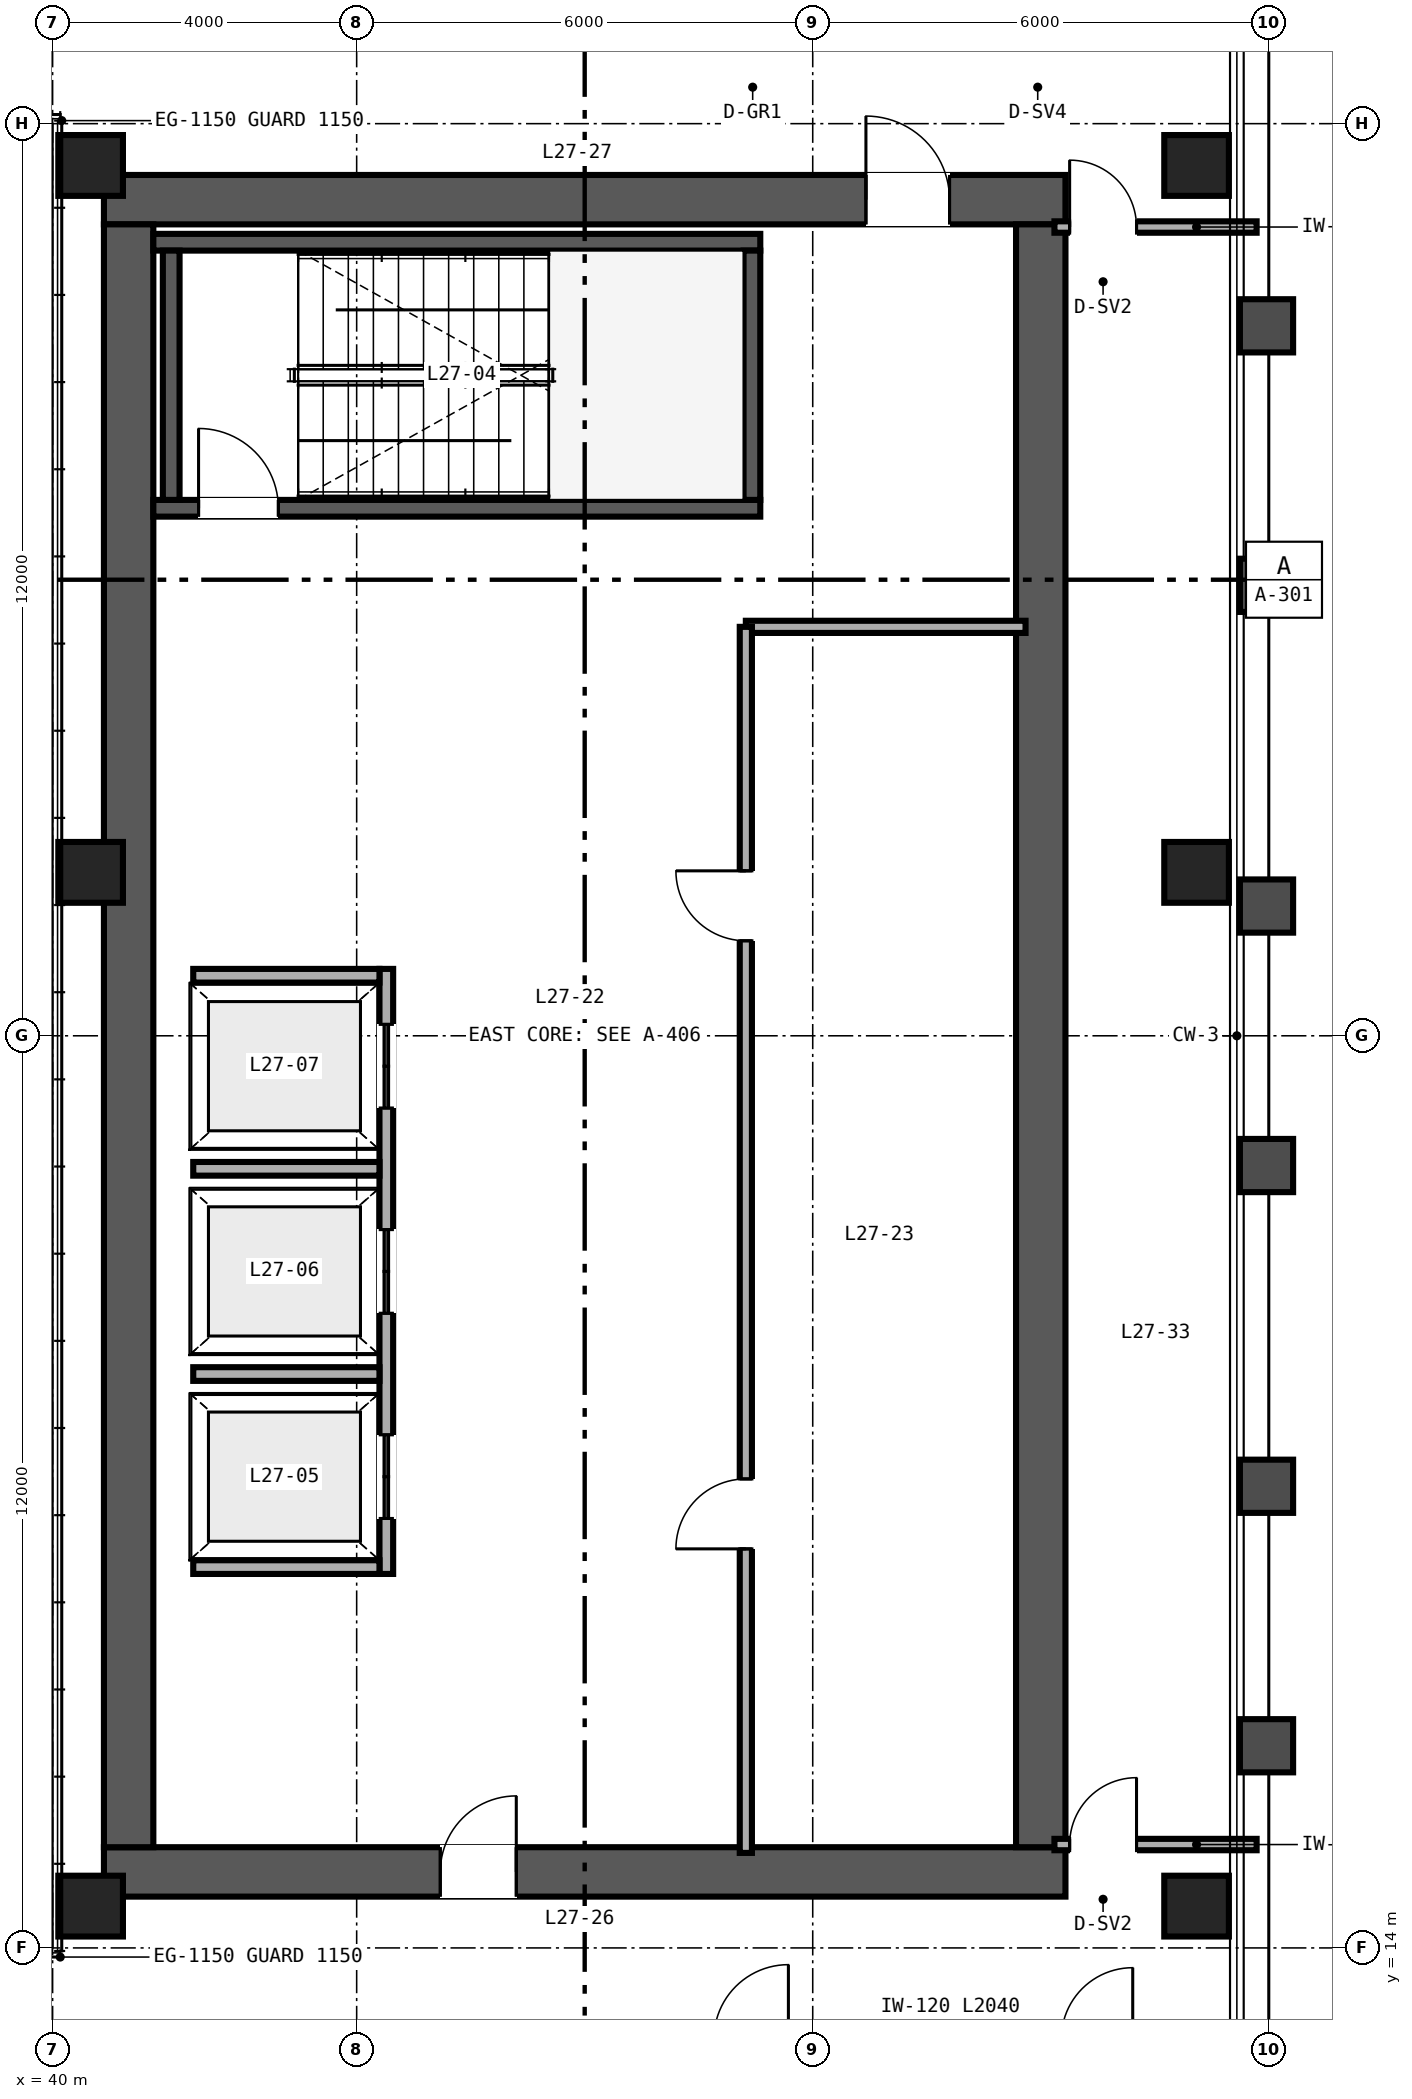
"""IFC4 building model, lengths in metres.
Left out: names, types, materials, properties, quantities, classifications, styles, units other than length and angle.
Written with IfcOpenShell. Run it as: python <this file> out.ifc"""

import sys

from ifc_helpers import new_model, si_unit, direction, frame, frame_2d, origin, origin_2d, place, context, subcontext, project, spatial, rectangle, hollow_rectangle, extrude, source, transform, mapped, element, fill, save


model = new_model("IFC4")
c1 = context("Model", 3, precision=1e-05, world=origin(), true_north=direction((0.0, 1.0)))
c2 = subcontext(c1, "Body", "Model", "MODEL_VIEW")
j1 = project(units=[si_unit("LENGTHUNIT", "METRE"), si_unit("PLANEANGLEUNIT", "RADIAN")], contexts=[c1])
p1 = place(None, origin())
s1 = spatial("IfcSite", under=j1, at=p1, CompositionType="ELEMENT")
p2 = place(p1, origin())
s2 = spatial("IfcBuilding", under=s1, at=p2, CompositionType="ELEMENT")
p3 = place(p2, frame((0.0, 0.0, 111.6)))
s3 = spatial("IfcBuildingStorey", under=s2, at=p3, CompositionType="ELEMENT", Elevation=111.6)
p4 = place(p3, frame((40.675, 15.0, 0.0), z_axis=(0.0, 0.0, 1.0), x_axis=(1.0, 0.0, 0.0)))
e1 = element("IfcWall", 1, at=p4, inside=s3, PredefinedType="SHEAR", context=c2, shape_type="SweptSolid", body=[
    extrude(rectangle(XDim=12.65, YDim=0.65, at=frame_2d((6.325, 0.0))), origin(), (0.0, 0.0, 1.0), 3.36),
])
p5 = place(p4, frame((4.425, 0.0, 0.0)))
e2 = element("IfcOpeningElement", 2, at=p5, cuts=e1, PredefinedType="OPENING", context=c2, shape_type="SweptSolid", body=[
    extrude(rectangle(XDim=1.0, YDim=2.15, at=frame_2d((0.5, 1.075))), frame((0.0, 0.335, 0.0), z_axis=(0.0, -1.0, 0.0), x_axis=(1.0, 0.0, 0.0)), (0.0, 0.0, 1.0), 0.67),
])
p6 = place(p3, frame((40.675, 37.0, 0.0), z_axis=(0.0, 0.0, 1.0), x_axis=(1.0, 0.0, 0.0)))
e3 = element("IfcWall", 3, at=p6, inside=s3, PredefinedType="SHEAR", context=c2, shape_type="SweptSolid", body=[
    extrude(rectangle(XDim=12.65, YDim=0.65, at=frame_2d((6.325, 0.0))), origin(), (0.0, 0.0, 1.0), 3.36),
])
p7 = place(p6, frame((10.025, 0.0, 0.0)))
e4 = element("IfcOpeningElement", 4, at=p7, cuts=e3, PredefinedType="OPENING", context=c2, shape_type="SweptSolid", body=[
    extrude(rectangle(XDim=1.1, YDim=2.15, at=frame_2d((0.55, 1.075))), frame((0.0, 0.335, 0.0), z_axis=(0.0, -1.0, 0.0), x_axis=(1.0, 0.0, 0.0)), (0.0, 0.0, 1.0), 0.67),
])
for number, where, z_axis, x_axis in (
    (5, (41.0, 15.325, 0.0), (0.0, 0.0, 1.0), (0.0, 1.0, 0.0)),
    (6, (53.0, 15.325, 0.0), (0.0, 0.0, 1.0), (0.0, 1.0, 0.0)),
):
    element("IfcWall", number, at=place(p3, frame(where, z_axis=z_axis, x_axis=x_axis)), inside=s3, PredefinedType="SHEAR", context=c2, shape_type="SweptSolid", body=[
        extrude(rectangle(XDim=21.35, YDim=0.65, at=frame_2d((10.675, 0.0))), origin(), (0.0, 0.0, 1.0), 3.36),
    ])
p8 = place(p3, frame((41.325, 32.94, 0.0), z_axis=(0.0, 0.0, 1.0), x_axis=(1.0, 0.0, 0.0)))
e7 = element("IfcWall", 7, at=p8, inside=s3, PredefinedType="SHEAR", context=c2, shape_type="SweptSolid", body=[
    extrude(rectangle(XDim=7.985, YDim=0.22, at=frame_2d((3.993, 0.0))), origin(), (0.0, 0.0, 1.0), 3.4),
])
p9 = place(p8, frame((0.595, 0.0, 0.0)))
e8 = element("IfcOpeningElement", 8, at=p9, cuts=e7, PredefinedType="OPENING", context=c2, shape_type="SweptSolid", body=[
    extrude(rectangle(XDim=1.05, YDim=2.15, at=frame_2d((0.525, 1.075))), frame((0.0, 0.12, 0.0), z_axis=(0.0, -1.0, 0.0), x_axis=(1.0, 0.0, 0.0)), (0.0, 0.0, 1.0), 0.24),
])
p10 = place(p3, frame((41.325, 36.44, 0.0), z_axis=(0.0, 0.0, 1.0), x_axis=(1.0, 0.0, 0.0)))
e9 = element("IfcWall", 9, at=p10, inside=s3, PredefinedType="SHEAR", context=c2, shape_type="SweptSolid", body=[
    extrude(rectangle(XDim=7.985, YDim=0.22, at=frame_2d((3.993, 0.0))), origin(), (0.0, 0.0, 1.0), 3.4),
])
for number, where, z_axis, x_axis in (
    (10, (41.56, 33.05, 0.0), (0.0, 0.0, 1.0), (0.0, 1.0, 0.0)),
    (11, (49.2, 33.05, 0.0), (0.0, 0.0, 1.0), (0.0, 1.0, 0.0)),
):
    element("IfcWall", number, at=place(p3, frame(where, z_axis=z_axis, x_axis=x_axis)), inside=s3, PredefinedType="SHEAR", context=c2, shape_type="SweptSolid", body=[
        extrude(rectangle(XDim=3.28, YDim=0.22, at=frame_2d((1.64, 0.0))), origin(), (0.0, 0.0, 1.0), 3.4),
    ])
m1 = source(origin(), c2, "Body", "SweptSolid", [
    extrude(hollow_rectangle(XDim=0.85, YDim=0.8, WallThickness=0.032, at=origin_2d()), origin(), (0.0, 0.0, 1.0), 3.36),
])
for number, where, z_axis, x_axis in (
    (12, (40.5, 14.55, 0.0), (0.0, 0.0, 1.0), (1.0, 0.0, 0.0)),
    (13, (55.05, 14.55, 0.0), (0.0, 0.0, 1.0), (1.0, 0.0, 0.0)),
    (14, (40.5, 28.15, 0.0), (0.0, 0.0, 1.0), (1.0, 0.0, 0.0)),
    (15, (55.05, 28.15, 0.0), (0.0, 0.0, 1.0), (1.0, 0.0, 0.0)),
    (16, (40.5, 37.45, 0.0), (0.0, 0.0, 1.0), (1.0, 0.0, 0.0)),
    (17, (55.05, 37.45, 0.0), (0.0, 0.0, 1.0), (1.0, 0.0, 0.0)),
):
    element("IfcColumn", number, at=place(p3, frame(where, z_axis=z_axis, x_axis=x_axis)), inside=s3, PredefinedType="COLUMN", context=c2, shape_type="MappedRepresentation", body=[
        mapped(m1, transform((0.0, 0.0, 0.0), scale=1.0)),
    ])
p11 = place(p3, frame((44.39, 18.92, 0.0), z_axis=(0.0, 0.0, 1.0), x_axis=(0.0, 1.0, 0.0)))
e18 = element("IfcWall", 18, at=p11, inside=s3, PredefinedType="SOLIDWALL", context=c2, shape_type="SweptSolid", body=[
    extrude(rectangle(XDim=7.96, YDim=0.18, at=frame_2d((3.98, 0.0))), origin(), (0.0, 0.0, 1.0), 3.36),
])
p12 = place(p11, frame((0.73, 0.0, 0.0)))
e19 = element("IfcOpeningElement", 19, at=p12, cuts=e18, PredefinedType="OPENING", context=c2, shape_type="SweptSolid", body=[
    extrude(rectangle(XDim=1.1, YDim=2.2, at=frame_2d((0.55, 1.1))), frame((0.0, 0.1, 0.0), z_axis=(0.0, -1.0, 0.0), x_axis=(1.0, 0.0, 0.0)), (0.0, 0.0, 1.0), 0.2),
])
p13 = place(p11, frame((3.43, 0.0, 0.0)))
e20 = element("IfcOpeningElement", 20, at=p13, cuts=e18, PredefinedType="OPENING", context=c2, shape_type="SweptSolid", body=[
    extrude(rectangle(XDim=1.1, YDim=2.2, at=frame_2d((0.55, 1.1))), frame((0.0, 0.1, 0.0), z_axis=(0.0, -1.0, 0.0), x_axis=(1.0, 0.0, 0.0)), (0.0, 0.0, 1.0), 0.2),
])
p14 = place(p11, frame((6.13, 0.0, 0.0)))
e21 = element("IfcOpeningElement", 21, at=p14, cuts=e18, PredefinedType="OPENING", context=c2, shape_type="SweptSolid", body=[
    extrude(rectangle(XDim=1.1, YDim=2.2, at=frame_2d((0.55, 1.1))), frame((0.0, 0.1, 0.0), z_axis=(0.0, -1.0, 0.0), x_axis=(1.0, 0.0, 0.0)), (0.0, 0.0, 1.0), 0.2),
])
for number, where, z_axis, x_axis in (
    (22, (41.85, 19.01, 0.0), (0.0, 0.0, 1.0), (1.0, 0.0, 0.0)),
    (23, (41.85, 26.79, 0.0), (0.0, 0.0, 1.0), (1.0, 0.0, 0.0)),
    (24, (41.85, 21.55, 0.0), (0.0, 0.0, 1.0), (1.0, 0.0, 0.0)),
    (25, (41.85, 24.25, 0.0), (0.0, 0.0, 1.0), (1.0, 0.0, 0.0)),
):
    element("IfcWall", number, at=place(p3, frame(where, z_axis=z_axis, x_axis=x_axis)), inside=s3, PredefinedType="SOLIDWALL", context=c2, shape_type="SweptSolid", body=[
        extrude(rectangle(XDim=2.45, YDim=0.18, at=frame_2d((1.225, 0.0))), origin(), (0.0, 0.0, 1.0), 3.36),
    ])
p15 = place(p3, frame((49.12, 31.38, 0.0), z_axis=(0.0, 0.0, 1.0), x_axis=(1.0, 0.0, 0.0)))
e26 = element("IfcWall", 26, at=p15, inside=s3, PredefinedType="PARTITIONING", context=c2, shape_type="SweptSolid", body=[
    extrude(rectangle(XDim=3.68, YDim=0.16, at=frame_2d((1.84, 0.0))), origin(), (0.0, 0.0, 1.0), 2.36),
])
p16 = place(p3, frame((49.12, 15.25, 0.0), z_axis=(0.0, 0.0, 1.0), x_axis=(0.0, 1.0, 0.0)))
e27 = element("IfcWall", 27, at=p16, inside=s3, PredefinedType="PARTITIONING", context=c2, shape_type="SweptSolid", body=[
    extrude(rectangle(XDim=16.13, YDim=0.16, at=frame_2d((8.065, 0.0))), origin(), (0.0, 0.0, 1.0), 2.36),
])
p17 = place(p16, frame((4.0, 0.0, 0.0)))
e28 = element("IfcOpeningElement", 28, at=p17, cuts=e27, PredefinedType="OPENING", context=c2, shape_type="SweptSolid", body=[
    extrude(rectangle(XDim=0.92, YDim=2.15, at=frame_2d((0.46, 1.075))), frame((0.0, 0.09, 0.0), z_axis=(0.0, -1.0, 0.0), x_axis=(1.0, 0.0, 0.0)), (0.0, 0.0, 1.0), 0.18),
])
p18 = place(p16, frame((12.0, 0.0, 0.0)))
e29 = element("IfcOpeningElement", 29, at=p18, cuts=e27, PredefinedType="OPENING", context=c2, shape_type="SweptSolid", body=[
    extrude(rectangle(XDim=0.92, YDim=2.15, at=frame_2d((0.46, 1.075))), frame((0.0, 0.09, 0.0), z_axis=(0.0, -1.0, 0.0), x_axis=(1.0, 0.0, 0.0)), (0.0, 0.0, 1.0), 0.18),
])
p19 = place(p3, frame((53.18, 15.36, 0.0), z_axis=(0.0, 0.0, 1.0), x_axis=(1.0, 0.0, 0.0)))
e30 = element("IfcWall", 30, at=p19, inside=s3, PredefinedType="PARTITIONING", context=c2, shape_type="SweptSolid", body=[
    extrude(rectangle(XDim=2.66, YDim=0.15, at=frame_2d((1.33, 0.0))), origin(), (0.0, 0.0, 1.0), 2.581),
])
p20 = place(p19, frame((0.2, 0.0, 0.0)))
e31 = element("IfcOpeningElement", 31, at=p20, cuts=e30, PredefinedType="OPENING", context=c2, shape_type="SweptSolid", body=[
    extrude(rectangle(XDim=0.88, YDim=2.15, at=frame_2d((0.44, 1.075))), frame((0.0, 0.085, 0.0), z_axis=(0.0, -1.0, 0.0), x_axis=(1.0, 0.0, 0.0)), (0.0, 0.0, 1.0), 0.17),
])
p21 = place(p3, frame((53.18, 36.64, 0.0), z_axis=(0.0, 0.0, 1.0), x_axis=(1.0, 0.0, 0.0)))
e32 = element("IfcWall", 32, at=p21, inside=s3, PredefinedType="PARTITIONING", context=c2, shape_type="SweptSolid", body=[
    extrude(rectangle(XDim=2.66, YDim=0.15, at=frame_2d((1.33, 0.0))), origin(), (0.0, 0.0, 1.0), 2.743),
])
p22 = place(p21, frame((0.2, 0.0, 0.0)))
e33 = element("IfcOpeningElement", 33, at=p22, cuts=e32, PredefinedType="OPENING", context=c2, shape_type="SweptSolid", body=[
    extrude(rectangle(XDim=0.88, YDim=2.15, at=frame_2d((0.44, 1.075))), frame((0.0, 0.085, 0.0), z_axis=(0.0, -1.0, 0.0), x_axis=(1.0, 0.0, 0.0)), (0.0, 0.0, 1.0), 0.17),
])
m2 = source(origin(), c2, "Body", "SweptSolid", [
    extrude(rectangle(XDim=1.05, YDim=2.15, at=frame_2d((0.525, 1.075))), frame((0.0, 0.025, 0.0), z_axis=(0.0, -1.0, 0.0), x_axis=(1.0, 0.0, 0.0)), (0.0, 0.0, 1.0), 0.05),
])
p23 = place(p9, origin())
e34 = element("IfcDoor", 34, at=p23, inside=s3, OperationType="SINGLE_SWING_LEFT", PredefinedType="DOOR", context=c2, shape_type="MappedRepresentation", body=[
    mapped(m2, transform((0.0, 0.0, 0.0), scale=1.0)),
])
fill(e8, e34)
m3 = source(origin(), c2, "Body", "SweptSolid", [
    extrude(rectangle(XDim=1.1, YDim=2.2, at=frame_2d((0.55, 1.1))), frame((0.0, 0.025, 0.0), z_axis=(0.0, -1.0, 0.0), x_axis=(1.0, 0.0, 0.0)), (0.0, 0.0, 1.0), 0.05),
])
p24 = place(p12, origin())
e35 = element("IfcDoor", 35, at=p24, inside=s3, OperationType="DOUBLE_DOOR_SLIDING", PredefinedType="DOOR", context=c2, shape_type="MappedRepresentation", body=[
    mapped(m3, transform((0.0, 0.0, 0.0), scale=1.0)),
])
fill(e19, e35)
p25 = place(p13, origin())
e36 = element("IfcDoor", 36, at=p25, inside=s3, OperationType="DOUBLE_DOOR_SLIDING", PredefinedType="DOOR", context=c2, shape_type="MappedRepresentation", body=[
    mapped(m3, transform((0.0, 0.0, 0.0), scale=1.0)),
])
fill(e20, e36)
p26 = place(p14, origin())
e37 = element("IfcDoor", 37, at=p26, inside=s3, OperationType="DOUBLE_DOOR_SLIDING", PredefinedType="DOOR", context=c2, shape_type="MappedRepresentation", body=[
    mapped(m3, transform((0.0, 0.0, 0.0), scale=1.0)),
])
fill(e21, e37)
m4 = source(origin(), c2, "Body", "SweptSolid", [
    extrude(rectangle(XDim=1.0, YDim=2.15, at=frame_2d((0.5, 1.075))), frame((0.0, 0.025, 0.0), z_axis=(0.0, -1.0, 0.0), x_axis=(1.0, 0.0, 0.0)), (0.0, 0.0, 1.0), 0.05),
])
p27 = place(p5, origin())
e38 = element("IfcDoor", 38, at=p27, inside=s3, OperationType="SINGLE_SWING_RIGHT", PredefinedType="DOOR", context=c2, shape_type="MappedRepresentation", body=[
    mapped(m4, transform((0.0, 0.0, 0.0), scale=1.0)),
])
fill(e2, e38)
m5 = source(origin(), c2, "Body", "SweptSolid", [
    extrude(rectangle(XDim=1.1, YDim=2.15, at=frame_2d((0.55, 1.075))), frame((0.0, 0.025, 0.0), z_axis=(0.0, -1.0, 0.0), x_axis=(1.0, 0.0, 0.0)), (0.0, 0.0, 1.0), 0.05),
])
p28 = place(p7, origin())
e39 = element("IfcDoor", 39, at=p28, inside=s3, OperationType="SINGLE_SWING_LEFT", PredefinedType="DOOR", context=c2, shape_type="MappedRepresentation", body=[
    mapped(m5, transform((0.0, 0.0, 0.0), scale=1.0)),
])
fill(e4, e39)
m6 = source(origin(), c2, "Body", "SweptSolid", [
    extrude(rectangle(XDim=0.92, YDim=2.15, at=frame_2d((0.46, 1.075))), frame((0.0, 0.025, 0.0), z_axis=(0.0, -1.0, 0.0), x_axis=(1.0, 0.0, 0.0)), (0.0, 0.0, 1.0), 0.05),
])
p29 = place(p17, origin())
e40 = element("IfcDoor", 40, at=p29, inside=s3, OperationType="SINGLE_SWING_LEFT", PredefinedType="DOOR", context=c2, shape_type="MappedRepresentation", body=[
    mapped(m6, transform((0.0, 0.0, 0.0), scale=1.0)),
])
fill(e28, e40)
p30 = place(p18, origin())
e41 = element("IfcDoor", 41, at=p30, inside=s3, OperationType="SINGLE_SWING_RIGHT", PredefinedType="DOOR", context=c2, shape_type="MappedRepresentation", body=[
    mapped(m6, transform((0.0, 0.0, 0.0), scale=1.0)),
])
fill(e29, e41)
m7 = source(origin(), c2, "Body", "SweptSolid", [
    extrude(rectangle(XDim=0.88, YDim=2.15, at=frame_2d((0.44, 1.075))), frame((0.0, 0.025, 0.0), z_axis=(0.0, -1.0, 0.0), x_axis=(1.0, 0.0, 0.0)), (0.0, 0.0, 1.0), 0.05),
])
p31 = place(p20, origin())
e42 = element("IfcDoor", 42, at=p31, inside=s3, OperationType="SINGLE_SWING_RIGHT", PredefinedType="DOOR", context=c2, shape_type="MappedRepresentation", body=[
    mapped(m7, transform((0.0, 0.0, 0.0), scale=1.0)),
])
fill(e31, e42)
p32 = place(p22, origin())
e43 = element("IfcDoor", 43, at=p32, inside=s3, OperationType="SINGLE_SWING_LEFT", PredefinedType="DOOR", context=c2, shape_type="MappedRepresentation", body=[
    mapped(m7, transform((0.0, 0.0, 0.0), scale=1.0)),
])
fill(e33, e43)
save(model, sys.argv[1])
